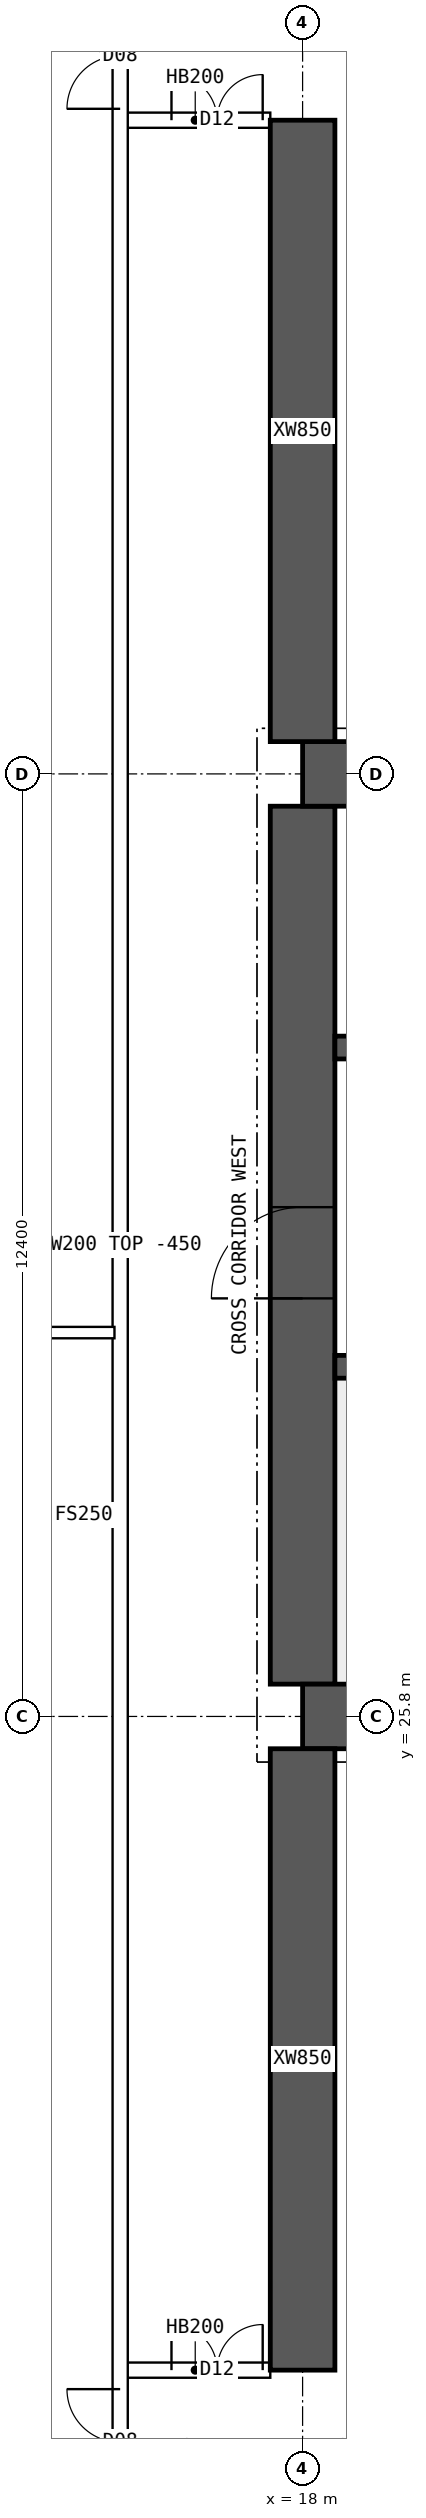
"""IFC4 building model, lengths in metres.
Left out: names, types, materials, properties, quantities, classifications, styles, units other than length and angle.
Written with IfcOpenShell. Run it as: python <this file> out.ifc"""

import sys

from ifc_helpers import new_model, si_unit, direction, frame, frame_2d, origin, place, context, subcontext, project, spatial, polyline, rectangle, outline, extrude, element, fill, save


model = new_model("IFC4")
c1 = context("Model", 3, precision=1e-05, world=origin(), true_north=direction((0.0, 1.0)))
c2 = subcontext(c1, "Body", "Model", "MODEL_VIEW")
j1 = project(units=[si_unit("LENGTHUNIT", "METRE"), si_unit("PLANEANGLEUNIT", "RADIAN")], contexts=[c1])
p1 = place(None, origin())
s1 = spatial("IfcSite", under=j1, at=p1, CompositionType="ELEMENT")
p2 = place(p1, origin())
s2 = spatial("IfcBuilding", under=s1, at=p2, CompositionType="ELEMENT")
p3 = place(p2, frame((0.0, 0.0, 189.85)))
s3 = spatial("IfcBuildingStorey", under=s2, at=p3, CompositionType="ELEMENT", Elevation=189.85)
for number, where, z_axis, x_axis in (
    (1, (18.0, 25.8, 0.0), (0.0, 0.0, 1.0), (1.0, 0.0, 0.0)),
    (2, (18.0, 38.2, 0.0), (0.0, 0.0, 1.0), (1.0, 0.0, 0.0)),
):
    element("IfcWall", number, at=place(p3, frame(where, z_axis=z_axis, x_axis=x_axis)), inside=s3, PredefinedType="SHEAR", context=c2, shape_type="SweptSolid", body=[
        extrude(rectangle(XDim=48.0, YDim=0.85, at=frame_2d((24.0, 0.0))), origin(), (0.0, 0.0, 1.0), 3.75),
    ])
p4 = place(p3, frame((18.0, 26.225, 0.0), z_axis=(0.0, 0.0, 1.0), x_axis=(0.0, 1.0, 0.0)))
e3 = element("IfcWall", 3, at=p4, inside=s3, PredefinedType="SHEAR", context=c2, shape_type="SweptSolid", body=[
    extrude(rectangle(XDim=11.55, YDim=0.85, at=frame_2d((5.775, 0.0))), origin(), (0.0, 0.0, 1.0), 3.75),
])
p5 = place(p4, frame((5.075, 0.0, 0.0)))
e4 = element("IfcOpeningElement", 4, at=p5, cuts=e3, PredefinedType="OPENING", context=c2, shape_type="SweptSolid", body=[
    extrude(rectangle(XDim=1.2, YDim=2.1, at=frame_2d((0.6, 1.05))), frame((0.0, 0.435, 0.0), z_axis=(0.0, -1.0, 0.0), x_axis=(1.0, 0.0, 0.0)), (0.0, 0.0, 1.0), 0.87),
])
p6 = place(p3, frame((18.425, 30.4, 0.0), z_axis=(0.0, 0.0, 1.0), x_axis=(1.0, 0.0, 0.0)))
e5 = element("IfcWall", 5, at=p6, inside=s3, PredefinedType="SHEAR", context=c2, shape_type="SweptSolid", body=[
    extrude(rectangle(XDim=47.15, YDim=0.3, at=frame_2d((23.575, 0.0))), origin(), (0.0, 0.0, 1.0), 3.75),
])
p7 = place(p6, frame((0.4, 0.0, 0.0)))
e6 = element("IfcOpeningElement", 6, at=p7, cuts=e5, PredefinedType="OPENING", context=c2, shape_type="SweptSolid", body=[
    extrude(rectangle(XDim=1.0, YDim=2.1, at=frame_2d((0.5, 1.05))), frame((0.0, 0.16, 0.0), z_axis=(0.0, -1.0, 0.0), x_axis=(1.0, 0.0, 0.0)), (0.0, 0.0, 1.0), 0.32),
])
p8 = place(p6, frame((45.75, 0.0, 0.0)))
e7 = element("IfcOpeningElement", 7, at=p8, cuts=e5, PredefinedType="OPENING", context=c2, shape_type="SweptSolid", body=[
    extrude(rectangle(XDim=1.0, YDim=2.1, at=frame_2d((0.5, 1.05))), frame((0.0, 0.16, 0.0), z_axis=(0.0, -1.0, 0.0), x_axis=(1.0, 0.0, 0.0)), (0.0, 0.0, 1.0), 0.32),
])
p9 = place(p6, frame((8.325, 0.0, 0.0)))
e8 = element("IfcOpeningElement", 8, at=p9, cuts=e5, PredefinedType="OPENING", context=c2, shape_type="SweptSolid", body=[
    extrude(rectangle(XDim=1.1, YDim=2.1, at=frame_2d((0.55, 1.05))), frame((0.0, 0.16, 0.0), z_axis=(0.0, -1.0, 0.0), x_axis=(1.0, 0.0, 0.0)), (0.0, 0.0, 1.0), 0.32),
])
p10 = place(p6, frame((10.925, 0.0, 0.0)))
e9 = element("IfcOpeningElement", 9, at=p10, cuts=e5, PredefinedType="OPENING", context=c2, shape_type="SweptSolid", body=[
    extrude(rectangle(XDim=1.1, YDim=2.1, at=frame_2d((0.55, 1.05))), frame((0.0, 0.16, 0.0), z_axis=(0.0, -1.0, 0.0), x_axis=(1.0, 0.0, 0.0)), (0.0, 0.0, 1.0), 0.32),
])
p11 = place(p6, frame((13.525, 0.0, 0.0)))
e10 = element("IfcOpeningElement", 10, at=p11, cuts=e5, PredefinedType="OPENING", context=c2, shape_type="SweptSolid", body=[
    extrude(rectangle(XDim=1.1, YDim=2.1, at=frame_2d((0.55, 1.05))), frame((0.0, 0.16, 0.0), z_axis=(0.0, -1.0, 0.0), x_axis=(1.0, 0.0, 0.0)), (0.0, 0.0, 1.0), 0.32),
])
p12 = place(p6, frame((16.125, 0.0, 0.0)))
e11 = element("IfcOpeningElement", 11, at=p12, cuts=e5, PredefinedType="OPENING", context=c2, shape_type="SweptSolid", body=[
    extrude(rectangle(XDim=1.1, YDim=2.1, at=frame_2d((0.55, 1.05))), frame((0.0, 0.16, 0.0), z_axis=(0.0, -1.0, 0.0), x_axis=(1.0, 0.0, 0.0)), (0.0, 0.0, 1.0), 0.32),
])
p13 = place(p6, frame((18.9, 0.0, 0.0)))
e12 = element("IfcOpeningElement", 12, at=p13, cuts=e5, PredefinedType="OPENING", context=c2, shape_type="SweptSolid", body=[
    extrude(rectangle(XDim=0.9, YDim=2.1, at=frame_2d((0.45, 1.05))), frame((0.0, 0.16, 0.0), z_axis=(0.0, -1.0, 0.0), x_axis=(1.0, 0.0, 0.0)), (0.0, 0.0, 1.0), 0.32),
])
p14 = place(p6, frame((30.192, 0.0, 0.0)))
e13 = element("IfcOpeningElement", 13, at=p14, cuts=e5, PredefinedType="OPENING", context=c2, shape_type="SweptSolid", body=[
    extrude(rectangle(XDim=1.1, YDim=2.1, at=frame_2d((0.55, 1.05))), frame((0.0, 0.16, 0.0), z_axis=(0.0, -1.0, 0.0), x_axis=(1.0, 0.0, 0.0)), (0.0, 0.0, 1.0), 0.32),
])
p15 = place(p6, frame((33.725, 0.0, 0.0)))
e14 = element("IfcOpeningElement", 14, at=p15, cuts=e5, PredefinedType="OPENING", context=c2, shape_type="SweptSolid", body=[
    extrude(rectangle(XDim=1.1, YDim=2.1, at=frame_2d((0.55, 1.05))), frame((0.0, 0.16, 0.0), z_axis=(0.0, -1.0, 0.0), x_axis=(1.0, 0.0, 0.0)), (0.0, 0.0, 1.0), 0.32),
])
p16 = place(p6, frame((37.258, 0.0, 0.0)))
e15 = element("IfcOpeningElement", 15, at=p16, cuts=e5, PredefinedType="OPENING", context=c2, shape_type="SweptSolid", body=[
    extrude(rectangle(XDim=1.1, YDim=2.1, at=frame_2d((0.55, 1.05))), frame((0.0, 0.16, 0.0), z_axis=(0.0, -1.0, 0.0), x_axis=(1.0, 0.0, 0.0)), (0.0, 0.0, 1.0), 0.32),
])
p17 = place(p3, frame((18.425, 34.6, 0.0), z_axis=(0.0, 0.0, 1.0), x_axis=(1.0, 0.0, 0.0)))
e16 = element("IfcWall", 16, at=p17, inside=s3, PredefinedType="SHEAR", context=c2, shape_type="SweptSolid", body=[
    extrude(rectangle(XDim=47.15, YDim=0.3, at=frame_2d((23.575, 0.0))), origin(), (0.0, 0.0, 1.0), 3.75),
])
p18 = place(p17, frame((0.9, 0.0, 0.0)))
e17 = element("IfcOpeningElement", 17, at=p18, cuts=e16, PredefinedType="OPENING", context=c2, shape_type="SweptSolid", body=[
    extrude(rectangle(XDim=1.1, YDim=2.1, at=frame_2d((0.55, 1.05))), frame((0.0, 0.16, 0.0), z_axis=(0.0, -1.0, 0.0), x_axis=(1.0, 0.0, 0.0)), (0.0, 0.0, 1.0), 0.32),
])
p19 = place(p17, frame((45.15, 0.0, 0.0)))
e18 = element("IfcOpeningElement", 18, at=p19, cuts=e16, PredefinedType="OPENING", context=c2, shape_type="SweptSolid", body=[
    extrude(rectangle(XDim=1.1, YDim=2.1, at=frame_2d((0.55, 1.05))), frame((0.0, 0.16, 0.0), z_axis=(0.0, -1.0, 0.0), x_axis=(1.0, 0.0, 0.0)), (0.0, 0.0, 1.0), 0.32),
])
p20 = place(p17, frame((4.175, 0.0, 0.0)))
e19 = element("IfcOpeningElement", 19, at=p20, cuts=e16, PredefinedType="OPENING", context=c2, shape_type="SweptSolid", body=[
    extrude(rectangle(XDim=0.9, YDim=2.1, at=frame_2d((0.45, 1.05))), frame((0.0, 0.16, 0.0), z_axis=(0.0, -1.0, 0.0), x_axis=(1.0, 0.0, 0.0)), (0.0, 0.0, 1.0), 0.32),
])
p21 = place(p17, frame((42.075, 0.0, 0.0)))
e20 = element("IfcOpeningElement", 20, at=p21, cuts=e16, PredefinedType="OPENING", context=c2, shape_type="SweptSolid", body=[
    extrude(rectangle(XDim=0.9, YDim=2.1, at=frame_2d((0.45, 1.05))), frame((0.0, 0.16, 0.0), z_axis=(0.0, -1.0, 0.0), x_axis=(1.0, 0.0, 0.0)), (0.0, 0.0, 1.0), 0.32),
])
p22 = place(p17, frame((8.95, 0.0, 0.0)))
e21 = element("IfcOpeningElement", 21, at=p22, cuts=e16, PredefinedType="OPENING", context=c2, shape_type="SweptSolid", body=[
    extrude(rectangle(XDim=0.9, YDim=2.1, at=frame_2d((0.45, 1.05))), frame((0.0, 0.16, 0.0), z_axis=(0.0, -1.0, 0.0), x_axis=(1.0, 0.0, 0.0)), (0.0, 0.0, 1.0), 0.32),
])
p23 = place(p17, frame((12.924, 0.0, 0.0)))
e22 = element("IfcOpeningElement", 22, at=p23, cuts=e16, PredefinedType="OPENING", context=c2, shape_type="SweptSolid", body=[
    extrude(rectangle(XDim=0.9, YDim=2.1, at=frame_2d((0.45, 1.05))), frame((0.0, 0.16, 0.0), z_axis=(0.0, -1.0, 0.0), x_axis=(1.0, 0.0, 0.0)), (0.0, 0.0, 1.0), 0.32),
])
p24 = place(p17, frame((16.571, 0.0, 0.0)))
e23 = element("IfcOpeningElement", 23, at=p24, cuts=e16, PredefinedType="OPENING", context=c2, shape_type="SweptSolid", body=[
    extrude(rectangle(XDim=0.9, YDim=2.1, at=frame_2d((0.45, 1.05))), frame((0.0, 0.16, 0.0), z_axis=(0.0, -1.0, 0.0), x_axis=(1.0, 0.0, 0.0)), (0.0, 0.0, 1.0), 0.32),
])
p25 = place(p17, frame((20.33, 0.0, 0.0)))
e24 = element("IfcOpeningElement", 24, at=p25, cuts=e16, PredefinedType="OPENING", context=c2, shape_type="SweptSolid", body=[
    extrude(rectangle(XDim=0.9, YDim=2.1, at=frame_2d((0.45, 1.05))), frame((0.0, 0.16, 0.0), z_axis=(0.0, -1.0, 0.0), x_axis=(1.0, 0.0, 0.0)), (0.0, 0.0, 1.0), 0.32),
])
p26 = place(p17, frame((24.736, 0.0, 0.0)))
e25 = element("IfcOpeningElement", 25, at=p26, cuts=e16, PredefinedType="OPENING", context=c2, shape_type="SweptSolid", body=[
    extrude(rectangle(XDim=0.9, YDim=2.1, at=frame_2d((0.45, 1.05))), frame((0.0, 0.16, 0.0), z_axis=(0.0, -1.0, 0.0), x_axis=(1.0, 0.0, 0.0)), (0.0, 0.0, 1.0), 0.32),
])
p27 = place(p17, frame((27.533, 0.0, 0.0)))
e26 = element("IfcOpeningElement", 26, at=p27, cuts=e16, PredefinedType="OPENING", context=c2, shape_type="SweptSolid", body=[
    extrude(rectangle(XDim=0.9, YDim=2.1, at=frame_2d((0.45, 1.05))), frame((0.0, 0.16, 0.0), z_axis=(0.0, -1.0, 0.0), x_axis=(1.0, 0.0, 0.0)), (0.0, 0.0, 1.0), 0.32),
])
p28 = place(p17, frame((30.716, 0.0, 0.0)))
e27 = element("IfcOpeningElement", 27, at=p28, cuts=e16, PredefinedType="OPENING", context=c2, shape_type="SweptSolid", body=[
    extrude(rectangle(XDim=0.9, YDim=2.1, at=frame_2d((0.45, 1.05))), frame((0.0, 0.16, 0.0), z_axis=(0.0, -1.0, 0.0), x_axis=(1.0, 0.0, 0.0)), (0.0, 0.0, 1.0), 0.32),
])
p29 = place(p17, frame((34.667, 0.0, 0.0)))
e28 = element("IfcOpeningElement", 28, at=p29, cuts=e16, PredefinedType="OPENING", context=c2, shape_type="SweptSolid", body=[
    extrude(rectangle(XDim=0.9, YDim=2.1, at=frame_2d((0.45, 1.05))), frame((0.0, 0.16, 0.0), z_axis=(0.0, -1.0, 0.0), x_axis=(1.0, 0.0, 0.0)), (0.0, 0.0, 1.0), 0.32),
])
p30 = place(p17, frame((37.605, 0.0, 0.0)))
e29 = element("IfcOpeningElement", 29, at=p30, cuts=e16, PredefinedType="OPENING", context=c2, shape_type="SweptSolid", body=[
    extrude(rectangle(XDim=0.9, YDim=2.1, at=frame_2d((0.45, 1.05))), frame((0.0, 0.16, 0.0), z_axis=(0.0, -1.0, 0.0), x_axis=(1.0, 0.0, 0.0)), (0.0, 0.0, 1.0), 0.32),
])
for number, where, z_axis, x_axis in (
    (30, (18.0, 17.2, 0.0), (0.0, 0.0, 1.0), (0.0, 1.0, 0.0)),
    (31, (18.0, 38.625, 0.0), (0.0, 0.0, 1.0), (0.0, 1.0, 0.0)),
):
    element("IfcWall", number, at=place(p3, frame(where, z_axis=z_axis, x_axis=x_axis)), inside=s3, PredefinedType="SHEAR", context=c2, shape_type="SweptSolid", body=[
        extrude(rectangle(XDim=8.175, YDim=0.85, at=frame_2d((4.087, 0.0))), origin(), (0.0, 0.0, 1.0), 3.75),
    ])
p31 = place(p3, frame((15.6, 17.2, 0.0), z_axis=(0.0, 0.0, 1.0), x_axis=(1.0, 0.0, 0.0)))
e32 = element("IfcWall", 32, at=p31, inside=s3, PredefinedType="SOLIDWALL", context=c2, shape_type="SweptSolid", body=[
    extrude(rectangle(XDim=1.975, YDim=0.2, at=frame_2d((0.987, 0.0))), origin(), (0.0, 0.0, 1.0), 3.3),
])
p32 = place(p31, frame((0.675, 0.0, 0.0)))
e33 = element("IfcOpeningElement", 33, at=p32, cuts=e32, PredefinedType="OPENING", context=c2, shape_type="SweptSolid", body=[
    extrude(rectangle(XDim=1.2, YDim=2.1, at=frame_2d((0.6, 1.05))), frame((0.0, 0.11, 0.0), z_axis=(0.0, -1.0, 0.0), x_axis=(1.0, 0.0, 0.0)), (0.0, 0.0, 1.0), 0.22),
])
p33 = place(p3, frame((15.6, 46.8, 0.0), z_axis=(0.0, 0.0, 1.0), x_axis=(1.0, 0.0, 0.0)))
e34 = element("IfcWall", 34, at=p33, inside=s3, PredefinedType="SOLIDWALL", context=c2, shape_type="SweptSolid", body=[
    extrude(rectangle(XDim=1.975, YDim=0.2, at=frame_2d((0.987, 0.0))), origin(), (0.0, 0.0, 1.0), 3.3),
])
p34 = place(p33, frame((0.675, 0.0, 0.0)))
e35 = element("IfcOpeningElement", 35, at=p34, cuts=e34, PredefinedType="OPENING", context=c2, shape_type="SweptSolid", body=[
    extrude(rectangle(XDim=1.2, YDim=2.1, at=frame_2d((0.6, 1.05))), frame((0.0, 0.11, 0.0), z_axis=(0.0, -1.0, 0.0), x_axis=(1.0, 0.0, 0.0)), (0.0, 0.0, 1.0), 0.22),
])
p35 = place(p3, frame((8.705, 30.85, 0.0), z_axis=(0.0, 0.0, 1.0), x_axis=(1.0, 0.0, 0.0)))
e36 = element("IfcWall", 36, at=p35, inside=s3, PredefinedType="PARTITIONING", context=c2, shape_type="SweptSolid", body=[
    extrude(outline(polyline([(0.0, 0.0), (6.82, 0.0), (6.82, 3.3), (3.597, 3.3), (3.595, 2.85), (2.997, 2.85), (2.995, 3.3), (0.0, 3.3), (0.0, 0.0)])), frame((0.0, 0.075, 0.0), z_axis=(0.0, -1.0, 0.0), x_axis=(1.0, 0.0, 0.0)), (0.0, 0.0, 1.0), 0.15),
])
p36 = place(p3, frame((15.6, 10.446, 0.0), z_axis=(0.0, 0.0, 1.0), x_axis=(0.0, 1.0, 0.0)))
e37 = element("IfcWall", 37, at=p36, inside=s3, PredefinedType="SOLIDWALL", context=c2, shape_type="SweptSolid", body=[
    extrude(rectangle(XDim=43.107, YDim=0.2, at=frame_2d((21.554, 0.0))), origin(), (0.0, 0.0, 1.0), 3.3),
])
p37 = place(p36, frame((5.104, 0.0, 0.0)))
e38 = element("IfcOpeningElement", 38, at=p37, cuts=e37, PredefinedType="OPENING", context=c2, shape_type="SweptSolid", body=[
    extrude(rectangle(XDim=1.4, YDim=2.1, at=frame_2d((0.7, 1.05))), frame((0.0, 0.11, 0.0), z_axis=(0.0, -1.0, 0.0), x_axis=(1.0, 0.0, 0.0)), (0.0, 0.0, 1.0), 0.22),
])
p38 = place(p36, frame((36.504, 0.0, 0.0)))
e39 = element("IfcOpeningElement", 39, at=p38, cuts=e37, PredefinedType="OPENING", context=c2, shape_type="SweptSolid", body=[
    extrude(rectangle(XDim=1.4, YDim=2.1, at=frame_2d((0.7, 1.05))), frame((0.0, 0.11, 0.0), z_axis=(0.0, -1.0, 0.0), x_axis=(1.0, 0.0, 0.0)), (0.0, 0.0, 1.0), 0.22),
])
p39 = place(p5, origin())
e40 = element("IfcDoor", 40, at=p39, inside=s3, OperationType="SINGLE_SWING_LEFT", PredefinedType="DOOR", context=c2, shape_type="SweptSolid", body=[
    extrude(rectangle(XDim=1.2, YDim=2.1, at=frame_2d((0.6, 1.05))), frame((0.0, 0.025, 0.0), z_axis=(0.0, -1.0, 0.0), x_axis=(1.0, 0.0, 0.0)), (0.0, 0.0, 1.0), 0.05),
])
fill(e4, e40)
p40 = place(p32, origin())
e41 = element("IfcDoor", 41, at=p40, inside=s3, OperationType="DOUBLE_DOOR_SINGLE_SWING", PredefinedType="DOOR", context=c2, shape_type="SweptSolid", body=[
    extrude(rectangle(XDim=1.2, YDim=2.1, at=frame_2d((0.6, 1.05))), frame((0.0, 0.025, 0.0), z_axis=(0.0, -1.0, 0.0), x_axis=(1.0, 0.0, 0.0)), (0.0, 0.0, 1.0), 0.05),
])
fill(e33, e41)
p41 = place(p34, origin())
e42 = element("IfcDoor", 42, at=p41, inside=s3, OperationType="DOUBLE_DOOR_SINGLE_SWING", PredefinedType="DOOR", context=c2, shape_type="SweptSolid", body=[
    extrude(rectangle(XDim=1.2, YDim=2.1, at=frame_2d((0.6, 1.05))), frame((0.0, 0.025, 0.0), z_axis=(0.0, -1.0, 0.0), x_axis=(1.0, 0.0, 0.0)), (0.0, 0.0, 1.0), 0.05),
])
fill(e35, e42)
p42 = place(p37, origin())
e43 = element("IfcDoor", 43, at=p42, inside=s3, OperationType="DOUBLE_DOOR_SINGLE_SWING", PredefinedType="DOOR", context=c2, shape_type="SweptSolid", body=[
    extrude(rectangle(XDim=1.4, YDim=2.1, at=frame_2d((0.7, 1.05))), frame((0.0, 0.025, 0.0), z_axis=(0.0, -1.0, 0.0), x_axis=(1.0, 0.0, 0.0)), (0.0, 0.0, 1.0), 0.05),
])
fill(e38, e43)
p43 = place(p38, origin())
e44 = element("IfcDoor", 44, at=p43, inside=s3, OperationType="DOUBLE_DOOR_SINGLE_SWING", PredefinedType="DOOR", context=c2, shape_type="SweptSolid", body=[
    extrude(rectangle(XDim=1.4, YDim=2.1, at=frame_2d((0.7, 1.05))), frame((0.0, 0.025, 0.0), z_axis=(0.0, -1.0, 0.0), x_axis=(1.0, 0.0, 0.0)), (0.0, 0.0, 1.0), 0.05),
])
fill(e39, e44)
save(model, sys.argv[1])
